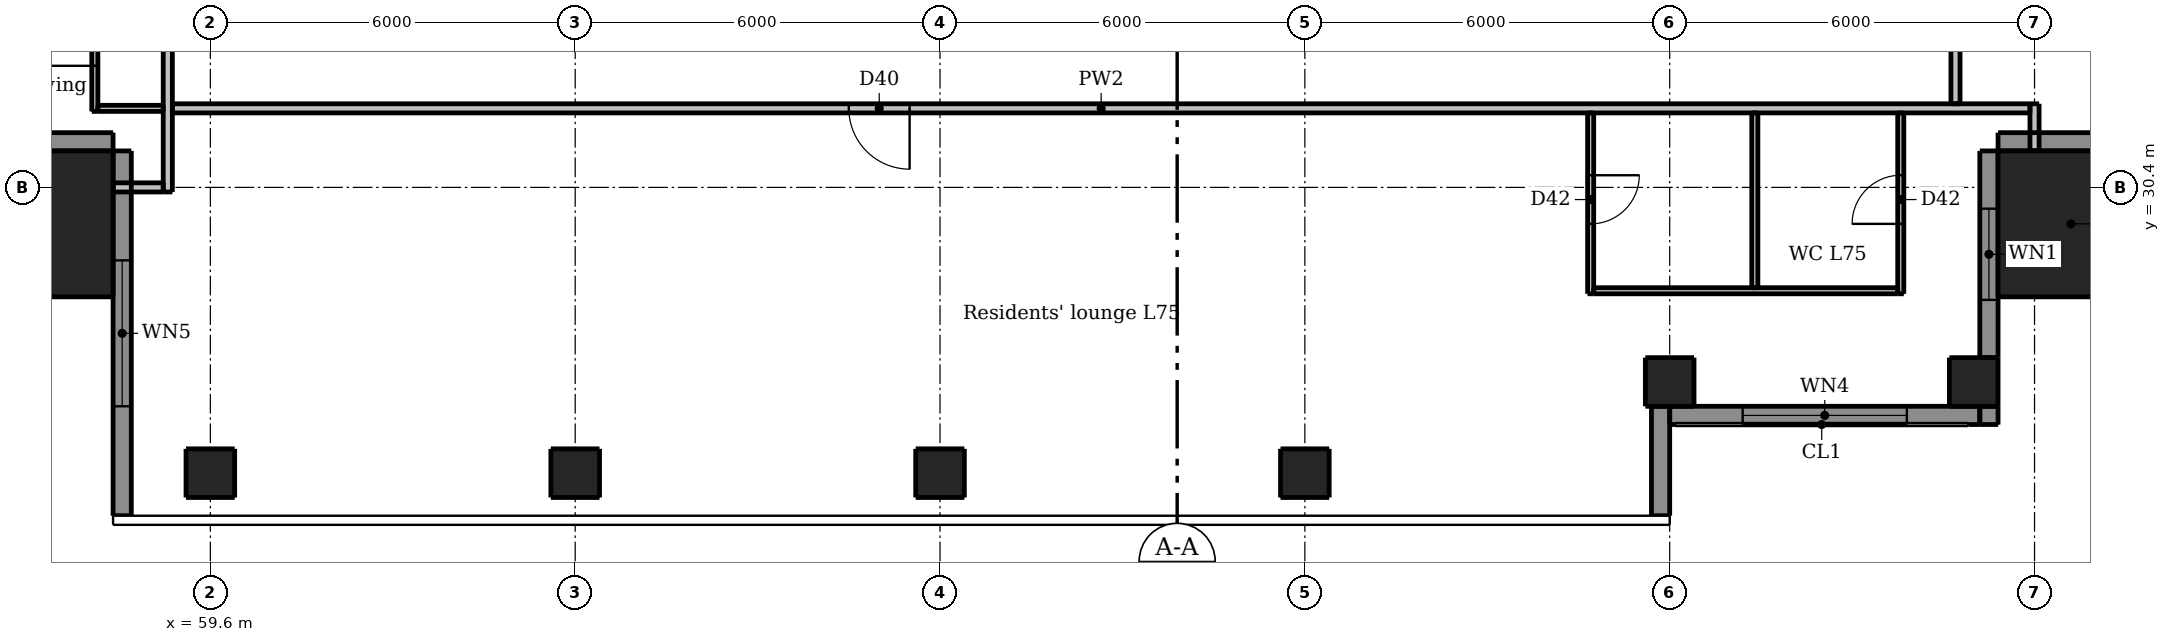
"""IFC4 building model, lengths in metres.
Left out: names, types, materials, properties, quantities, classifications, styles, units other than length and angle.
Written with IfcOpenShell. Run it as: python <this file> out.ifc"""

import sys

from ifc_helpers import new_model, si_unit, direction, frame, frame_2d, origin, origin_2d, place, context, subcontext, project, spatial, rectangle, extrude, element, fill, save


model = new_model("IFC4")
c1 = context("Model", 3, precision=1e-05, world=origin(), true_north=direction((0.0, 1.0)))
c2 = subcontext(c1, "Body", "Model", "MODEL_VIEW")
j1 = project(units=[si_unit("LENGTHUNIT", "METRE"), si_unit("PLANEANGLEUNIT", "RADIAN")], contexts=[c1])
p1 = place(None, origin())
s1 = spatial("IfcSite", under=j1, at=p1, CompositionType="ELEMENT")
p2 = place(p1, origin())
s2 = spatial("IfcBuilding", under=s1, at=p2, CompositionType="ELEMENT")
p3 = place(p2, frame((0.0, 0.0, 278.5)))
s3 = spatial("IfcBuildingStorey", under=s2, at=p3, CompositionType="ELEMENT", Elevation=278.5)
for number, where, z_axis, x_axis in (
    (1, (59.6, 25.7, 0.0), (0.0, 0.0, 1.0), (1.0, 0.0, 0.0)),
    (2, (65.6, 25.7, 0.0), (0.0, 0.0, 1.0), (1.0, 0.0, 0.0)),
    (3, (71.6, 25.7, 0.0), (0.0, 0.0, 1.0), (1.0, 0.0, 0.0)),
    (4, (77.6, 25.7, 0.0), (0.0, 0.0, 1.0), (1.0, 0.0, 0.0)),
    (5, (83.6, 27.2, 0.0), (0.0, 0.0, 1.0), (1.0, 0.0, 0.0)),
    (6, (88.6, 27.2, 0.0), (0.0, 0.0, 1.0), (1.0, 0.0, 0.0)),
):
    element("IfcColumn", number, at=place(p3, frame(where, z_axis=z_axis, x_axis=x_axis)), inside=s3, PredefinedType="COLUMN", context=c2, shape_type="SweptSolid", body=[
        extrude(rectangle(XDim=0.8, YDim=0.8, at=origin_2d()), origin(), (0.0, 0.0, 1.0), 3.0),
    ])
for number, where, z_axis, x_axis in (
    (7, (56.8, 29.8, 0.0), (0.0, 0.0, 1.0), (1.0, 0.0, 0.0)),
    (8, (90.2, 29.8, 0.0), (0.0, 0.0, 1.0), (1.0, 0.0, 0.0)),
):
    element("IfcColumn", number, at=place(p3, frame(where, z_axis=z_axis, x_axis=x_axis)), inside=s3, PredefinedType="COLUMN", context=c2, shape_type="SweptSolid", body=[
        extrude(rectangle(XDim=2.4, YDim=2.4, at=origin_2d()), origin(), (0.0, 0.0, 1.0), 3.3),
    ])
p4 = place(p3, frame((83.45, 25.0, 0.0), z_axis=(0.0, 0.0, 1.0), x_axis=(0.0, 1.0, 0.0)))
e9 = element("IfcWall", 9, at=p4, inside=s3, PredefinedType="SOLIDWALL", context=c2, shape_type="SweptSolid", body=[
    extrude(rectangle(XDim=1.8, YDim=0.3, at=frame_2d((0.9, 0.0))), origin(), (0.0, 0.0, 1.0), 3.0),
])
p5 = place(p3, frame((88.85, 26.5, 0.0), z_axis=(0.0, 0.0, 1.0), x_axis=(0.0, 1.0, 0.0)))
e10 = element("IfcWall", 10, at=p5, inside=s3, PredefinedType="SOLIDWALL", context=c2, shape_type="SweptSolid", body=[
    extrude(rectangle(XDim=0.3, YDim=0.3, at=frame_2d((0.15, 0.0))), origin(), (0.0, 0.0, 1.0), 3.0),
])
p6 = place(p3, frame((88.85, 27.6, 0.0), z_axis=(0.0, 0.0, 1.0), x_axis=(0.0, 1.0, 0.0)))
e11 = element("IfcWall", 11, at=p6, inside=s3, PredefinedType="SOLIDWALL", context=c2, shape_type="SweptSolid", body=[
    extrude(rectangle(XDim=3.4, YDim=0.3, at=frame_2d((1.7, 0.0))), origin(), (0.0, 0.0, 1.0), 3.0),
])
p7 = place(p6, frame((0.95, 0.0, 0.9)))
e12 = element("IfcOpeningElement", 12, at=p7, cuts=e11, PredefinedType="OPENING", context=c2, shape_type="SweptSolid", body=[
    extrude(rectangle(XDim=1.5, YDim=1.5, at=frame_2d((0.75, 0.75))), frame((0.0, 0.16, 0.0), z_axis=(0.0, -1.0, 0.0), x_axis=(1.0, 0.0, 0.0)), (0.0, 0.0, 1.0), 0.32),
])
p8 = place(p3, frame((89.0, 31.15, 0.0), z_axis=(0.0, 0.0, 1.0), x_axis=(1.0, 0.0, 0.0)))
e13 = element("IfcWall", 13, at=p8, inside=s3, PredefinedType="SOLIDWALL", context=c2, shape_type="SweptSolid", body=[
    extrude(rectangle(XDim=3.4, YDim=0.3, at=frame_2d((1.7, 0.0))), origin(), (0.0, 0.0, 1.0), 3.0),
])
p9 = place(p3, frame((53.0, 31.15, 0.0), z_axis=(0.0, 0.0, 1.0), x_axis=(1.0, 0.0, 0.0)))
e14 = element("IfcWall", 14, at=p9, inside=s3, PredefinedType="SOLIDWALL", context=c2, shape_type="SweptSolid", body=[
    extrude(rectangle(XDim=5.0, YDim=0.3, at=frame_2d((2.5, 0.0))), origin(), (0.0, 0.0, 1.0), 3.0),
])
p10 = place(p3, frame((58.15, 31.0, 0.0), z_axis=(0.0, 0.0, 1.0), x_axis=(0.0, -1.0, 0.0)))
e15 = element("IfcWall", 15, at=p10, inside=s3, PredefinedType="SOLIDWALL", context=c2, shape_type="SweptSolid", body=[
    extrude(rectangle(XDim=6.0, YDim=0.3, at=frame_2d((3.0, 0.0))), origin(), (0.0, 0.0, 1.0), 3.0),
])
p11 = place(p10, frame((1.8, 0.0, 0.15)))
e16 = element("IfcOpeningElement", 16, at=p11, cuts=e15, PredefinedType="OPENING", context=c2, shape_type="SweptSolid", body=[
    extrude(rectangle(XDim=2.4, YDim=2.1, at=frame_2d((1.2, 1.05))), frame((0.0, 0.16, 0.0), z_axis=(0.0, -1.0, 0.0), x_axis=(1.0, 0.0, 0.0)), (0.0, 0.0, 1.0), 0.32),
])
p12 = place(p3, frame((83.6, 26.65, 0.0), z_axis=(0.0, 0.0, 1.0), x_axis=(1.0, 0.0, 0.0)))
e17 = element("IfcWall", 17, at=p12, inside=s3, PredefinedType="SOLIDWALL", context=c2, shape_type="SweptSolid", body=[
    extrude(rectangle(XDim=5.1, YDim=0.3, at=frame_2d((2.55, 0.0))), origin(), (0.0, 0.0, 1.0), 3.0),
])
p13 = place(p12, frame((1.2, 0.0, 0.15)))
e18 = element("IfcOpeningElement", 18, at=p13, cuts=e17, PredefinedType="OPENING", context=c2, shape_type="SweptSolid", body=[
    extrude(rectangle(XDim=2.7, YDim=2.1, at=frame_2d((1.35, 1.05))), frame((0.0, 0.16, 0.0), z_axis=(0.0, -1.0, 0.0), x_axis=(1.0, 0.0, 0.0)), (0.0, 0.0, 1.0), 0.32),
])
p14 = place(p3, frame((57.7, 31.65, 0.0), z_axis=(0.0, 0.0, 1.0), x_axis=(0.0, 1.0, 0.0)))
e19 = element("IfcWall", 19, at=p14, inside=s3, PredefinedType="PARTITIONING", context=c2, shape_type="SweptSolid", body=[
    extrude(rectangle(XDim=16.675, YDim=0.1, at=frame_2d((8.337, 0.0))), origin(), (0.0, 0.0, 1.0), 3.0),
])
p15 = place(p14, frame((0.75, 0.0, 0.0)))
e20 = element("IfcOpeningElement", 20, at=p15, cuts=e19, PredefinedType="OPENING", context=c2, shape_type="SweptSolid", body=[
    extrude(rectangle(XDim=0.9, YDim=2.1, at=frame_2d((0.45, 1.05))), frame((0.0, 0.06, 0.0), z_axis=(0.0, -1.0, 0.0), x_axis=(1.0, 0.0, 0.0)), (0.0, 0.0, 1.0), 0.12),
])
p16 = place(p14, frame((3.1, 0.0, 0.0)))
e21 = element("IfcOpeningElement", 21, at=p16, cuts=e19, PredefinedType="OPENING", context=c2, shape_type="SweptSolid", body=[
    extrude(rectangle(XDim=0.9, YDim=2.1, at=frame_2d((0.45, 1.05))), frame((0.0, 0.06, 0.0), z_axis=(0.0, -1.0, 0.0), x_axis=(1.0, 0.0, 0.0)), (0.0, 0.0, 1.0), 0.12),
])
p17 = place(p14, frame((8.5, 0.0, 0.0)))
e22 = element("IfcOpeningElement", 22, at=p17, cuts=e19, PredefinedType="OPENING", context=c2, shape_type="SweptSolid", body=[
    extrude(rectangle(XDim=0.9, YDim=2.1, at=frame_2d((0.45, 1.05))), frame((0.0, 0.06, 0.0), z_axis=(0.0, -1.0, 0.0), x_axis=(1.0, 0.0, 0.0)), (0.0, 0.0, 1.0), 0.12),
])
p18 = place(p14, frame((14.5, 0.0, 0.0)))
e23 = element("IfcOpeningElement", 23, at=p18, cuts=e19, PredefinedType="OPENING", context=c2, shape_type="SweptSolid", body=[
    extrude(rectangle(XDim=0.9, YDim=2.1, at=frame_2d((0.45, 1.05))), frame((0.0, 0.06, 0.0), z_axis=(0.0, -1.0, 0.0), x_axis=(1.0, 0.0, 0.0)), (0.0, 0.0, 1.0), 0.12),
])
p19 = place(p14, frame((5.55, 0.0, 0.0)))
e24 = element("IfcOpeningElement", 24, at=p19, cuts=e19, PredefinedType="OPENING", context=c2, shape_type="SweptSolid", body=[
    extrude(rectangle(XDim=0.8, YDim=2.1, at=frame_2d((0.4, 1.05))), frame((0.0, 0.06, 0.0), z_axis=(0.0, -1.0, 0.0), x_axis=(1.0, 0.0, 0.0)), (0.0, 0.0, 1.0), 0.12),
])
p20 = place(p14, frame((11.55, 0.0, 0.0)))
e25 = element("IfcOpeningElement", 25, at=p20, cuts=e19, PredefinedType="OPENING", context=c2, shape_type="SweptSolid", body=[
    extrude(rectangle(XDim=0.8, YDim=2.1, at=frame_2d((0.4, 1.05))), frame((0.0, 0.06, 0.0), z_axis=(0.0, -1.0, 0.0), x_axis=(1.0, 0.0, 0.0)), (0.0, 0.0, 1.0), 0.12),
])
p21 = place(p3, frame((82.3, 31.625, 0.0), z_axis=(0.0, 0.0, 1.0), x_axis=(0.0, -1.0, 0.0)))
e26 = element("IfcWall", 26, at=p21, inside=s3, PredefinedType="PARTITIONING", context=c2, shape_type="SweptSolid", body=[
    extrude(rectangle(XDim=2.975, YDim=0.1, at=frame_2d((1.488, 0.0))), origin(), (0.0, 0.0, 1.0), 3.0),
])
p22 = place(p21, frame((1.025, 0.0, 0.0)))
e27 = element("IfcOpeningElement", 27, at=p22, cuts=e26, PredefinedType="OPENING", context=c2, shape_type="SweptSolid", body=[
    extrude(rectangle(XDim=0.8, YDim=2.1, at=frame_2d((0.4, 1.05))), frame((0.0, 0.06, 0.0), z_axis=(0.0, -1.0, 0.0), x_axis=(1.0, 0.0, 0.0)), (0.0, 0.0, 1.0), 0.12),
])
p23 = place(p3, frame((85.0, 28.75, 0.0), z_axis=(0.0, 0.0, 1.0), x_axis=(0.0, 1.0, 0.0)))
e28 = element("IfcWall", 28, at=p23, inside=s3, PredefinedType="PARTITIONING", context=c2, shape_type="SweptSolid", body=[
    extrude(rectangle(XDim=2.875, YDim=0.1, at=frame_2d((1.438, 0.0))), origin(), (0.0, 0.0, 1.0), 3.0),
])
p24 = place(p3, frame((87.4, 28.65, 0.0), z_axis=(0.0, 0.0, 1.0), x_axis=(0.0, 1.0, 0.0)))
e29 = element("IfcWall", 29, at=p24, inside=s3, PredefinedType="PARTITIONING", context=c2, shape_type="SweptSolid", body=[
    extrude(rectangle(XDim=2.975, YDim=0.1, at=frame_2d((1.488, 0.0))), origin(), (0.0, 0.0, 1.0), 3.0),
])
p25 = place(p24, frame((1.15, 0.0, 0.0)))
e30 = element("IfcOpeningElement", 30, at=p25, cuts=e29, PredefinedType="OPENING", context=c2, shape_type="SweptSolid", body=[
    extrude(rectangle(XDim=0.8, YDim=2.1, at=frame_2d((0.4, 1.05))), frame((0.0, 0.06, 0.0), z_axis=(0.0, -1.0, 0.0), x_axis=(1.0, 0.0, 0.0)), (0.0, 0.0, 1.0), 0.12),
])
p26 = place(p3, frame((57.75, 31.7, 0.0), z_axis=(0.0, 0.0, 1.0), x_axis=(1.0, 0.0, 0.0)))
e31 = element("IfcWall", 31, at=p26, inside=s3, PredefinedType="PARTITIONING", context=c2, shape_type="SweptSolid", body=[
    extrude(rectangle(XDim=1.075, YDim=0.1, at=frame_2d((0.538, 0.0))), origin(), (0.0, 0.0, 1.0), 3.0),
])
p27 = place(p3, frame((82.35, 28.7, 0.0), z_axis=(0.0, 0.0, 1.0), x_axis=(1.0, 0.0, 0.0)))
e32 = element("IfcWall", 32, at=p27, inside=s3, PredefinedType="PARTITIONING", context=c2, shape_type="SweptSolid", body=[
    extrude(rectangle(XDim=5.0, YDim=0.1, at=frame_2d((2.5, 0.0))), origin(), (0.0, 0.0, 1.0), 3.0),
])
p28 = place(p3, frame((58.9, 30.325, 0.0), z_axis=(0.0, 0.0, 1.0), x_axis=(0.0, 1.0, 0.0)))
e33 = element("IfcWall", 33, at=p28, inside=s3, PredefinedType="PARTITIONING", context=c2, shape_type="SweptSolid", body=[
    extrude(rectangle(XDim=30.85, YDim=0.15, at=frame_2d((15.425, 0.0))), origin(), (0.0, 0.0, 1.0), 3.0),
])
p29 = place(p28, frame((9.225, 0.0, 0.0)))
e34 = element("IfcOpeningElement", 34, at=p29, cuts=e33, PredefinedType="OPENING", context=c2, shape_type="SweptSolid", body=[
    extrude(rectangle(XDim=1.0, YDim=2.1, at=frame_2d((0.5, 1.05))), frame((0.0, 0.085, 0.0), z_axis=(0.0, -1.0, 0.0), x_axis=(1.0, 0.0, 0.0)), (0.0, 0.0, 1.0), 0.17),
])
p30 = place(p28, frame((26.925, 0.0, 0.0)))
e35 = element("IfcOpeningElement", 35, at=p30, cuts=e33, PredefinedType="OPENING", context=c2, shape_type="SweptSolid", body=[
    extrude(rectangle(XDim=1.0, YDim=2.1, at=frame_2d((0.5, 1.05))), frame((0.0, 0.085, 0.0), z_axis=(0.0, -1.0, 0.0), x_axis=(1.0, 0.0, 0.0)), (0.0, 0.0, 1.0), 0.17),
])
p31 = place(p3, frame((88.3, 61.175, 0.0), z_axis=(0.0, 0.0, 1.0), x_axis=(0.0, -1.0, 0.0)))
e36 = element("IfcWall", 36, at=p31, inside=s3, PredefinedType="PARTITIONING", context=c2, shape_type="SweptSolid", body=[
    extrude(rectangle(XDim=29.4, YDim=0.15, at=frame_2d((14.7, 0.0))), origin(), (0.0, 0.0, 1.0), 3.0),
])
p32 = place(p31, frame((26.625, 0.0, 0.0)))
e37 = element("IfcOpeningElement", 37, at=p32, cuts=e36, PredefinedType="OPENING", context=c2, shape_type="SweptSolid", body=[
    extrude(rectangle(XDim=1.0, YDim=2.1, at=frame_2d((0.5, 1.05))), frame((0.0, 0.085, 0.0), z_axis=(0.0, -1.0, 0.0), x_axis=(1.0, 0.0, 0.0)), (0.0, 0.0, 1.0), 0.17),
])
p33 = place(p31, frame((9.275, 0.0, 0.0)))
e38 = element("IfcOpeningElement", 38, at=p33, cuts=e36, PredefinedType="OPENING", context=c2, shape_type="SweptSolid", body=[
    extrude(rectangle(XDim=1.0, YDim=2.1, at=frame_2d((0.5, 1.05))), frame((0.0, 0.085, 0.0), z_axis=(0.0, -1.0, 0.0), x_axis=(1.0, 0.0, 0.0)), (0.0, 0.0, 1.0), 0.17),
])
p34 = place(p3, frame((89.6, 31.0, 0.0), z_axis=(0.0, 0.0, 1.0), x_axis=(0.0, 1.0, 0.0)))
e39 = element("IfcWall", 39, at=p34, inside=s3, PredefinedType="PARTITIONING", context=c2, shape_type="SweptSolid", body=[
    extrude(rectangle(XDim=0.775, YDim=0.15, at=frame_2d((0.387, 0.0))), origin(), (0.0, 0.0, 1.0), 3.0),
])
p35 = place(p3, frame((89.525, 31.7, 0.0), z_axis=(0.0, 0.0, 1.0), x_axis=(-1.0, 0.0, 0.0)))
e40 = element("IfcWall", 40, at=p35, inside=s3, PredefinedType="PARTITIONING", context=c2, shape_type="SweptSolid", body=[
    extrude(rectangle(XDim=30.55, YDim=0.15, at=frame_2d((15.275, 0.0))), origin(), (0.0, 0.0, 1.0), 3.0),
])
p36 = place(p35, frame((18.425, 0.0, 0.0)))
e41 = element("IfcOpeningElement", 41, at=p36, cuts=e40, PredefinedType="OPENING", context=c2, shape_type="SweptSolid", body=[
    extrude(rectangle(XDim=1.0, YDim=2.1, at=frame_2d((0.5, 1.05))), frame((0.0, 0.085, 0.0), z_axis=(0.0, -1.0, 0.0), x_axis=(1.0, 0.0, 0.0)), (0.0, 0.0, 1.0), 0.17),
])
p37 = place(p3, frame((58.0, 30.4, 0.0), z_axis=(0.0, 0.0, 1.0), x_axis=(1.0, 0.0, 0.0)))
e42 = element("IfcWall", 42, at=p37, inside=s3, PredefinedType="PARTITIONING", context=c2, shape_type="SweptSolid", body=[
    extrude(rectangle(XDim=0.825, YDim=0.15, at=frame_2d((0.413, 0.0))), origin(), (0.0, 0.0, 1.0), 3.0),
])
p38 = place(p7, origin())
e43 = element("IfcWindow", 43, at=p38, inside=s3, PartitioningType="DOUBLE_PANEL_VERTICAL", PredefinedType="WINDOW", context=c2, shape_type="SweptSolid", body=[
    extrude(rectangle(XDim=1.5, YDim=1.5, at=frame_2d((0.75, 0.75))), frame((0.0, 0.03, 0.0), z_axis=(0.0, -1.0, 0.0), x_axis=(1.0, 0.0, 0.0)), (0.0, 0.0, 1.0), 0.06),
])
fill(e12, e43)
p39 = place(p11, origin())
e44 = element("IfcWindow", 44, at=p39, inside=s3, PartitioningType="DOUBLE_PANEL_VERTICAL", PredefinedType="WINDOW", context=c2, shape_type="SweptSolid", body=[
    extrude(rectangle(XDim=2.4, YDim=2.1, at=frame_2d((1.2, 1.05))), frame((0.0, 0.03, 0.0), z_axis=(0.0, -1.0, 0.0), x_axis=(1.0, 0.0, 0.0)), (0.0, 0.0, 1.0), 0.06),
])
fill(e16, e44)
p40 = place(p13, origin())
e45 = element("IfcWindow", 45, at=p40, inside=s3, PartitioningType="DOUBLE_PANEL_VERTICAL", PredefinedType="WINDOW", context=c2, shape_type="SweptSolid", body=[
    extrude(rectangle(XDim=2.7, YDim=2.1, at=frame_2d((1.35, 1.05))), frame((0.0, 0.03, 0.0), z_axis=(0.0, -1.0, 0.0), x_axis=(1.0, 0.0, 0.0)), (0.0, 0.0, 1.0), 0.06),
])
fill(e18, e45)
p41 = place(p36, origin())
e46 = element("IfcDoor", 46, at=p41, inside=s3, OperationType="SINGLE_SWING_LEFT", PredefinedType="DOOR", context=c2, shape_type="SweptSolid", body=[
    extrude(rectangle(XDim=1.0, YDim=2.1, at=frame_2d((0.5, 1.05))), frame((0.0, 0.025, 0.0), z_axis=(0.0, -1.0, 0.0), x_axis=(1.0, 0.0, 0.0)), (0.0, 0.0, 1.0), 0.05),
])
fill(e41, e46)
p42 = place(p22, origin())
e47 = element("IfcDoor", 47, at=p42, inside=s3, OperationType="SINGLE_SWING_LEFT", PredefinedType="DOOR", context=c2, shape_type="SweptSolid", body=[
    extrude(rectangle(XDim=0.8, YDim=2.1, at=frame_2d((0.4, 1.05))), frame((0.0, 0.025, 0.0), z_axis=(0.0, -1.0, 0.0), x_axis=(1.0, 0.0, 0.0)), (0.0, 0.0, 1.0), 0.05),
])
fill(e27, e47)
p43 = place(p25, origin())
e48 = element("IfcDoor", 48, at=p43, inside=s3, OperationType="SINGLE_SWING_LEFT", PredefinedType="DOOR", context=c2, shape_type="SweptSolid", body=[
    extrude(rectangle(XDim=0.8, YDim=2.1, at=frame_2d((0.4, 1.05))), frame((0.0, 0.025, 0.0), z_axis=(0.0, -1.0, 0.0), x_axis=(1.0, 0.0, 0.0)), (0.0, 0.0, 1.0), 0.05),
])
fill(e30, e48)
p44 = place(p15, origin())
e49 = element("IfcDoor", 49, at=p44, inside=s3, OperationType="SINGLE_SWING_LEFT", PredefinedType="DOOR", context=c2, shape_type="SweptSolid", body=[
    extrude(rectangle(XDim=0.9, YDim=2.1, at=frame_2d((0.45, 1.05))), frame((0.0, 0.025, 0.0), z_axis=(0.0, -1.0, 0.0), x_axis=(1.0, 0.0, 0.0)), (0.0, 0.0, 1.0), 0.05),
])
fill(e20, e49)
save(model, sys.argv[1])
